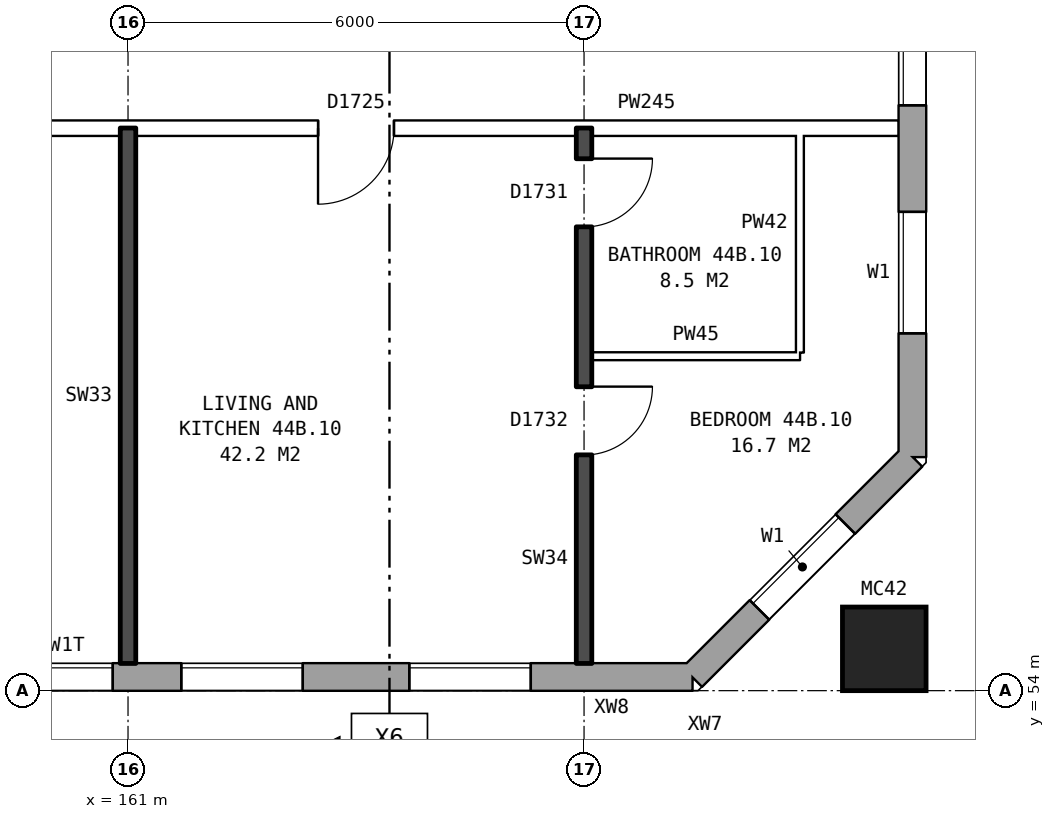
"""IFC4 building model, lengths in metres.
Left out: names, types, materials, properties, quantities, classifications, styles, units other than length and angle.
Written with IfcOpenShell. Run it as: python <this file> out.ifc"""

import sys

from ifc_helpers import new_model, si_unit, direction, frame, frame_2d, origin, origin_2d, place, context, subcontext, project, spatial, rectangle, hollow_rectangle, extrude, element, fill, save


model = new_model("IFC4")
c1 = context("Model", 3, precision=1e-05, world=origin(), true_north=direction((0.0, 1.0)))
c2 = subcontext(c1, "Body", "Model", "MODEL_VIEW")
j1 = project(units=[si_unit("LENGTHUNIT", "METRE"), si_unit("PLANEANGLEUNIT", "RADIAN")], contexts=[c1])
p1 = place(None, origin())
s1 = spatial("IfcSite", under=j1, at=p1, CompositionType="ELEMENT")
p2 = place(p1, origin())
s2 = spatial("IfcBuilding", under=s1, at=p2, CompositionType="ELEMENT")
p3 = place(p2, frame((0.0, 0.0, 157.8)))
s3 = spatial("IfcBuildingStorey", under=s2, at=p3, CompositionType="ELEMENT", Elevation=157.8)
p4 = place(p3, frame((170.95, 54.55, 0.0), z_axis=(0.0, 0.0, 1.0), x_axis=(1.0, 0.0, 0.0)))
e1 = element("IfcColumn", 1, at=p4, inside=s3, PredefinedType="COLUMN", context=c2, shape_type="SweptSolid", body=[
    extrude(hollow_rectangle(XDim=1.1, YDim=1.1, WallThickness=0.06, at=origin_2d()), origin(), (0.0, 0.0, 1.0), 3.1),
])
p5 = place(p3, frame((134.075, 54.18, 0.0), z_axis=(0.0, 0.0, 1.0), x_axis=(1.0, 0.0, 0.0)))
e2 = element("IfcWall", 2, at=p5, inside=s3, PredefinedType="STANDARD", context=c2, shape_type="SweptSolid", body=[
    extrude(rectangle(XDim=34.351, YDim=0.36, at=frame_2d((17.175, 0.0))), origin(), (0.0, 0.0, 1.0), 2.85),
])
p6 = place(p5, frame((0.625, 0.0, 0.8)))
e3 = element("IfcOpeningElement", 3, at=p6, cuts=e2, PredefinedType="OPENING", context=c2, shape_type="SweptSolid", body=[
    extrude(rectangle(XDim=1.6, YDim=1.8, at=frame_2d((0.8, 0.9))), frame((0.0, 0.19, 0.0), z_axis=(0.0, -1.0, 0.0), x_axis=(1.0, 0.0, 0.0)), (0.0, 0.0, 1.0), 0.38),
])
p7 = place(p5, frame((3.625, 0.0, 0.8)))
e4 = element("IfcOpeningElement", 4, at=p7, cuts=e2, PredefinedType="OPENING", context=c2, shape_type="SweptSolid", body=[
    extrude(rectangle(XDim=1.6, YDim=1.8, at=frame_2d((0.8, 0.9))), frame((0.0, 0.19, 0.0), z_axis=(0.0, -1.0, 0.0), x_axis=(1.0, 0.0, 0.0)), (0.0, 0.0, 1.0), 0.38),
])
p8 = place(p5, frame((5.525, 0.0, 0.8)))
e5 = element("IfcOpeningElement", 5, at=p8, cuts=e2, PredefinedType="OPENING", context=c2, shape_type="SweptSolid", body=[
    extrude(rectangle(XDim=1.4, YDim=1.8, at=frame_2d((0.7, 0.9))), frame((0.0, 0.19, 0.0), z_axis=(0.0, -1.0, 0.0), x_axis=(1.0, 0.0, 0.0)), (0.0, 0.0, 1.0), 0.38),
])
p9 = place(p5, frame((9.575, 0.0, 0.45)))
e6 = element("IfcOpeningElement", 6, at=p9, cuts=e2, PredefinedType="OPENING", context=c2, shape_type="SweptSolid", body=[
    extrude(rectangle(XDim=0.6, YDim=0.9, at=frame_2d((0.3, 0.45))), frame((0.0, 0.19, 0.0), z_axis=(0.0, -1.0, 0.0), x_axis=(1.0, 0.0, 0.0)), (0.0, 0.0, 1.0), 0.38),
])
p10 = place(p5, frame((12.625, 0.0, 0.8)))
e7 = element("IfcOpeningElement", 7, at=p10, cuts=e2, PredefinedType="OPENING", context=c2, shape_type="SweptSolid", body=[
    extrude(rectangle(XDim=1.6, YDim=1.8, at=frame_2d((0.8, 0.9))), frame((0.0, 0.19, 0.0), z_axis=(0.0, -1.0, 0.0), x_axis=(1.0, 0.0, 0.0)), (0.0, 0.0, 1.0), 0.38),
])
p11 = place(p5, frame((15.625, 0.0, 0.8)))
e8 = element("IfcOpeningElement", 8, at=p11, cuts=e2, PredefinedType="OPENING", context=c2, shape_type="SweptSolid", body=[
    extrude(rectangle(XDim=1.6, YDim=1.8, at=frame_2d((0.8, 0.9))), frame((0.0, 0.19, 0.0), z_axis=(0.0, -1.0, 0.0), x_axis=(1.0, 0.0, 0.0)), (0.0, 0.0, 1.0), 0.38),
])
p12 = place(p5, frame((18.625, 0.0, 0.8)))
e9 = element("IfcOpeningElement", 9, at=p12, cuts=e2, PredefinedType="OPENING", context=c2, shape_type="SweptSolid", body=[
    extrude(rectangle(XDim=1.6, YDim=1.8, at=frame_2d((0.8, 0.9))), frame((0.0, 0.19, 0.0), z_axis=(0.0, -1.0, 0.0), x_axis=(1.0, 0.0, 0.0)), (0.0, 0.0, 1.0), 0.38),
])
p13 = place(p5, frame((21.625, 0.0, 0.8)))
e10 = element("IfcOpeningElement", 10, at=p13, cuts=e2, PredefinedType="OPENING", context=c2, shape_type="SweptSolid", body=[
    extrude(rectangle(XDim=1.6, YDim=1.8, at=frame_2d((0.8, 0.9))), frame((0.0, 0.19, 0.0), z_axis=(0.0, -1.0, 0.0), x_axis=(1.0, 0.0, 0.0)), (0.0, 0.0, 1.0), 0.38),
])
p14 = place(p5, frame((23.525, 0.0, 0.8)))
e11 = element("IfcOpeningElement", 11, at=p14, cuts=e2, PredefinedType="OPENING", context=c2, shape_type="SweptSolid", body=[
    extrude(rectangle(XDim=0.8, YDim=0.9, at=frame_2d((0.4, 0.45))), frame((0.0, 0.19, 0.0), z_axis=(0.0, -1.0, 0.0), x_axis=(1.0, 0.0, 0.0)), (0.0, 0.0, 1.0), 0.38),
])
p15 = place(p5, frame((27.625, 0.0, 0.8)))
e12 = element("IfcOpeningElement", 12, at=p15, cuts=e2, PredefinedType="OPENING", context=c2, shape_type="SweptSolid", body=[
    extrude(rectangle(XDim=1.6, YDim=1.8, at=frame_2d((0.8, 0.9))), frame((0.0, 0.19, 0.0), z_axis=(0.0, -1.0, 0.0), x_axis=(1.0, 0.0, 0.0)), (0.0, 0.0, 1.0), 0.38),
])
p16 = place(p5, frame((30.625, 0.0, 0.8)))
e13 = element("IfcOpeningElement", 13, at=p16, cuts=e2, PredefinedType="OPENING", context=c2, shape_type="SweptSolid", body=[
    extrude(rectangle(XDim=1.6, YDim=1.8, at=frame_2d((0.8, 0.9))), frame((0.0, 0.19, 0.0), z_axis=(0.0, -1.0, 0.0), x_axis=(1.0, 0.0, 0.0)), (0.0, 0.0, 1.0), 0.38),
])
p17 = place(p5, frame((7.225, 0.0, 1.0)))
e14 = element("IfcOpeningElement", 14, at=p17, cuts=e2, PredefinedType="OPENING", context=c2, shape_type="SweptSolid", body=[
    extrude(rectangle(XDim=0.8, YDim=1.5, at=frame_2d((0.4, 0.75))), frame((0.0, 0.19, 0.0), z_axis=(0.0, -1.0, 0.0), x_axis=(1.0, 0.0, 0.0)), (0.0, 0.0, 1.0), 0.38),
])
p18 = place(p5, frame((10.575, 0.0, 0.45)))
e15 = element("IfcOpeningElement", 15, at=p18, cuts=e2, PredefinedType="OPENING", context=c2, shape_type="SweptSolid", body=[
    extrude(rectangle(XDim=1.2, YDim=1.8, at=frame_2d((0.6, 0.9))), frame((0.0, 0.19, 0.0), z_axis=(0.0, -1.0, 0.0), x_axis=(1.0, 0.0, 0.0)), (0.0, 0.0, 1.0), 0.38),
])
p19 = place(p5, frame((25.525, 0.0, 1.7)))
e16 = element("IfcOpeningElement", 16, at=p19, cuts=e2, PredefinedType="OPENING", context=c2, shape_type="SweptSolid", body=[
    extrude(rectangle(XDim=1.2, YDim=0.9, at=frame_2d((0.6, 0.45))), frame((0.0, 0.19, 0.0), z_axis=(0.0, -1.0, 0.0), x_axis=(1.0, 0.0, 0.0)), (0.0, 0.0, 1.0), 0.38),
])
p20 = place(p3, frame((168.425, 54.18, 0.0), z_axis=(0.0, 0.0, 1.0), x_axis=(0.707106781187, 0.707106781187, 0.0)))
e17 = element("IfcWall", 17, at=p20, inside=s3, PredefinedType="STANDARD", context=c2, shape_type="SweptSolid", body=[
    extrude(rectangle(XDim=4.094, YDim=0.36, at=frame_2d((2.047, 0.0))), origin(), (0.0, 0.0, 1.0), 2.85),
])
p21 = place(p20, frame((1.247, 0.0, 0.8)))
e18 = element("IfcOpeningElement", 18, at=p21, cuts=e17, PredefinedType="OPENING", context=c2, shape_type="SweptSolid", body=[
    extrude(rectangle(XDim=1.6, YDim=1.8, at=frame_2d((0.8, 0.9))), frame((0.0, 0.19, 0.0), z_axis=(0.0, -1.0, 0.0), x_axis=(1.0, 0.0, 0.0)), (0.0, 0.0, 1.0), 0.38),
])
p22 = place(p3, frame((171.32, 57.075, 0.0), z_axis=(0.0, 0.0, 1.0), x_axis=(0.0, 1.0, 0.0)))
e19 = element("IfcWall", 19, at=p22, inside=s3, PredefinedType="STANDARD", context=c2, shape_type="SweptSolid", body=[
    extrude(rectangle(XDim=25.851, YDim=0.36, at=frame_2d((12.925, 0.0))), origin(), (0.0, 0.0, 1.0), 2.85),
])
p23 = place(p22, frame((1.625, 0.0, 0.8)))
e20 = element("IfcOpeningElement", 20, at=p23, cuts=e19, PredefinedType="OPENING", context=c2, shape_type="SweptSolid", body=[
    extrude(rectangle(XDim=1.6, YDim=1.8, at=frame_2d((0.8, 0.9))), frame((0.0, 0.19, 0.0), z_axis=(0.0, -1.0, 0.0), x_axis=(1.0, 0.0, 0.0)), (0.0, 0.0, 1.0), 0.38),
])
p24 = place(p22, frame((4.625, 0.0, 0.8)))
e21 = element("IfcOpeningElement", 21, at=p24, cuts=e19, PredefinedType="OPENING", context=c2, shape_type="SweptSolid", body=[
    extrude(rectangle(XDim=1.6, YDim=1.8, at=frame_2d((0.8, 0.9))), frame((0.0, 0.19, 0.0), z_axis=(0.0, -1.0, 0.0), x_axis=(1.0, 0.0, 0.0)), (0.0, 0.0, 1.0), 0.38),
])
p25 = place(p22, frame((6.525, 0.0, 0.8)))
e22 = element("IfcOpeningElement", 22, at=p25, cuts=e19, PredefinedType="OPENING", context=c2, shape_type="SweptSolid", body=[
    extrude(rectangle(XDim=1.6, YDim=1.5, at=frame_2d((0.8, 0.75))), frame((0.0, 0.19, 0.0), z_axis=(0.0, -1.0, 0.0), x_axis=(1.0, 0.0, 0.0)), (0.0, 0.0, 1.0), 0.38),
])
p26 = place(p22, frame((8.425, 0.0, 0.8)))
e23 = element("IfcOpeningElement", 23, at=p26, cuts=e19, PredefinedType="OPENING", context=c2, shape_type="SweptSolid", body=[
    extrude(rectangle(XDim=0.6, YDim=0.9, at=frame_2d((0.3, 0.45))), frame((0.0, 0.19, 0.0), z_axis=(0.0, -1.0, 0.0), x_axis=(1.0, 0.0, 0.0)), (0.0, 0.0, 1.0), 0.38),
])
p27 = place(p22, frame((10.225, 0.0, 1.7)))
e24 = element("IfcOpeningElement", 24, at=p27, cuts=e19, PredefinedType="OPENING", context=c2, shape_type="SweptSolid", body=[
    extrude(rectangle(XDim=1.2, YDim=0.9, at=frame_2d((0.6, 0.45))), frame((0.0, 0.19, 0.0), z_axis=(0.0, -1.0, 0.0), x_axis=(1.0, 0.0, 0.0)), (0.0, 0.0, 1.0), 0.38),
])
p28 = place(p22, frame((11.725, 0.0, 0.8)))
e25 = element("IfcOpeningElement", 25, at=p28, cuts=e19, PredefinedType="OPENING", context=c2, shape_type="SweptSolid", body=[
    extrude(rectangle(XDim=1.6, YDim=1.8, at=frame_2d((0.8, 0.9))), frame((0.0, 0.19, 0.0), z_axis=(0.0, -1.0, 0.0), x_axis=(1.0, 0.0, 0.0)), (0.0, 0.0, 1.0), 0.38),
])
p29 = place(p22, frame((19.625, 0.0, 0.8)))
e26 = element("IfcOpeningElement", 26, at=p29, cuts=e19, PredefinedType="OPENING", context=c2, shape_type="SweptSolid", body=[
    extrude(rectangle(XDim=1.6, YDim=1.8, at=frame_2d((0.8, 0.9))), frame((0.0, 0.19, 0.0), z_axis=(0.0, -1.0, 0.0), x_axis=(1.0, 0.0, 0.0)), (0.0, 0.0, 1.0), 0.38),
])
p30 = place(p22, frame((22.625, 0.0, 0.8)))
e27 = element("IfcOpeningElement", 27, at=p30, cuts=e19, PredefinedType="OPENING", context=c2, shape_type="SweptSolid", body=[
    extrude(rectangle(XDim=1.6, YDim=1.8, at=frame_2d((0.8, 0.9))), frame((0.0, 0.19, 0.0), z_axis=(0.0, -1.0, 0.0), x_axis=(1.0, 0.0, 0.0)), (0.0, 0.0, 1.0), 0.38),
])
p31 = place(p22, frame((13.625, 0.0, 1.1)))
e28 = element("IfcOpeningElement", 28, at=p31, cuts=e19, PredefinedType="OPENING", context=c2, shape_type="SweptSolid", body=[
    extrude(rectangle(XDim=1.0, YDim=1.5, at=frame_2d((0.5, 0.75))), frame((0.0, 0.19, 0.0), z_axis=(0.0, -1.0, 0.0), x_axis=(1.0, 0.0, 0.0)), (0.0, 0.0, 1.0), 0.38),
])
p32 = place(p22, frame((14.925, 0.0, 1.7)))
e29 = element("IfcOpeningElement", 29, at=p32, cuts=e19, PredefinedType="OPENING", context=c2, shape_type="SweptSolid", body=[
    extrude(rectangle(XDim=0.6, YDim=0.9, at=frame_2d((0.3, 0.45))), frame((0.0, 0.19, 0.0), z_axis=(0.0, -1.0, 0.0), x_axis=(1.0, 0.0, 0.0)), (0.0, 0.0, 1.0), 0.38),
])
p33 = place(p22, frame((16.675, 0.0, 0.8)))
e30 = element("IfcOpeningElement", 30, at=p33, cuts=e19, PredefinedType="OPENING", context=c2, shape_type="SweptSolid", body=[
    extrude(rectangle(XDim=0.6, YDim=0.9, at=frame_2d((0.3, 0.45))), frame((0.0, 0.19, 0.0), z_axis=(0.0, -1.0, 0.0), x_axis=(1.0, 0.0, 0.0)), (0.0, 0.0, 1.0), 0.38),
])
p34 = place(p22, frame((17.675, 0.0, 0.8)))
e31 = element("IfcOpeningElement", 31, at=p34, cuts=e19, PredefinedType="OPENING", context=c2, shape_type="SweptSolid", body=[
    extrude(rectangle(XDim=1.6, YDim=1.5, at=frame_2d((0.8, 0.75))), frame((0.0, 0.19, 0.0), z_axis=(0.0, -1.0, 0.0), x_axis=(1.0, 0.0, 0.0)), (0.0, 0.0, 1.0), 0.38),
])
p35 = place(p3, frame((167.1, 58.4, 0.0), z_axis=(0.0, 0.0, 1.0), x_axis=(1.0, 0.0, 0.0)))
e32 = element("IfcWall", 32, at=p35, inside=s3, PredefinedType="PARTITIONING", context=c2, shape_type="SweptSolid", body=[
    extrude(rectangle(XDim=2.74, YDim=0.1, at=frame_2d((1.37, 0.0))), origin(), (0.0, 0.0, 1.0), 2.85),
])
p36 = place(p3, frame((155.1, 61.4, 0.0), z_axis=(0.0, 0.0, 1.0), x_axis=(1.0, 0.0, 0.0)))
e33 = element("IfcWall", 33, at=p36, inside=s3, PredefinedType="PARTITIONING", context=c2, shape_type="SweptSolid", body=[
    extrude(rectangle(XDim=16.04, YDim=0.2, at=frame_2d((8.02, 0.0))), origin(), (0.0, 0.0, 1.0), 2.85),
])
p37 = place(p36, frame((3.6, 0.0, 0.0)))
e34 = element("IfcOpeningElement", 34, at=p37, cuts=e33, PredefinedType="OPENING", context=c2, shape_type="SweptSolid", body=[
    extrude(rectangle(XDim=1.0, YDim=2.1, at=frame_2d((0.5, 1.05))), frame((0.0, 0.11, 0.0), z_axis=(0.0, -1.0, 0.0), x_axis=(1.0, 0.0, 0.0)), (0.0, 0.0, 1.0), 0.22),
])
p38 = place(p36, frame((8.4, 0.0, 0.0)))
e35 = element("IfcOpeningElement", 35, at=p38, cuts=e33, PredefinedType="OPENING", context=c2, shape_type="SweptSolid", body=[
    extrude(rectangle(XDim=1.0, YDim=2.1, at=frame_2d((0.5, 1.05))), frame((0.0, 0.11, 0.0), z_axis=(0.0, -1.0, 0.0), x_axis=(1.0, 0.0, 0.0)), (0.0, 0.0, 1.0), 0.22),
])
p39 = place(p3, frame((161.0, 54.36, 0.0), z_axis=(0.0, 0.0, 1.0), x_axis=(0.0, 1.0, 0.0)))
e36 = element("IfcWall", 36, at=p39, inside=s3, PredefinedType="SOLIDWALL", context=c2, shape_type="SweptSolid", body=[
    extrude(rectangle(XDim=7.04, YDim=0.2, at=frame_2d((3.52, 0.0))), origin(), (0.0, 0.0, 1.0), 2.85),
])
p40 = place(p3, frame((167.0, 54.36, 0.0), z_axis=(0.0, 0.0, 1.0), x_axis=(0.0, 1.0, 0.0)))
e37 = element("IfcWall", 37, at=p40, inside=s3, PredefinedType="SOLIDWALL", context=c2, shape_type="SweptSolid", body=[
    extrude(rectangle(XDim=7.04, YDim=0.2, at=frame_2d((3.52, 0.0))), origin(), (0.0, 0.0, 1.0), 2.85),
])
p41 = place(p40, frame((2.74, 0.0, 0.0)))
e38 = element("IfcOpeningElement", 38, at=p41, cuts=e37, PredefinedType="OPENING", context=c2, shape_type="SweptSolid", body=[
    extrude(rectangle(XDim=0.9, YDim=2.1, at=frame_2d((0.45, 1.05))), frame((0.0, 0.11, 0.0), z_axis=(0.0, -1.0, 0.0), x_axis=(1.0, 0.0, 0.0)), (0.0, 0.0, 1.0), 0.22),
])
p42 = place(p40, frame((5.74, 0.0, 0.0)))
e39 = element("IfcOpeningElement", 39, at=p42, cuts=e37, PredefinedType="OPENING", context=c2, shape_type="SweptSolid", body=[
    extrude(rectangle(XDim=0.9, YDim=2.1, at=frame_2d((0.45, 1.05))), frame((0.0, 0.11, 0.0), z_axis=(0.0, -1.0, 0.0), x_axis=(1.0, 0.0, 0.0)), (0.0, 0.0, 1.0), 0.22),
])
p43 = place(p3, frame((169.84, 58.45, 0.0), z_axis=(0.0, 0.0, 1.0), x_axis=(0.0, 1.0, 0.0)))
e40 = element("IfcWall", 40, at=p43, inside=s3, PredefinedType="PARTITIONING", context=c2, shape_type="SweptSolid", body=[
    extrude(rectangle(XDim=2.85, YDim=0.1, at=frame_2d((1.425, 0.0))), origin(), (0.0, 0.0, 1.0), 2.85),
])
p44 = place(p15, origin())
e41 = element("IfcWindow", 41, at=p44, inside=s3, PartitioningType="SINGLE_PANEL", PredefinedType="WINDOW", context=c2, shape_type="SweptSolid", body=[
    extrude(rectangle(XDim=1.6, YDim=1.8, at=frame_2d((0.8, 0.9))), frame((0.0, 0.15, 0.0), z_axis=(0.0, -1.0, 0.0), x_axis=(1.0, 0.0, 0.0)), (0.0, 0.0, 1.0), 0.06),
])
fill(e12, e41)
p45 = place(p16, origin())
e42 = element("IfcWindow", 42, at=p45, inside=s3, PartitioningType="SINGLE_PANEL", PredefinedType="WINDOW", context=c2, shape_type="SweptSolid", body=[
    extrude(rectangle(XDim=1.6, YDim=1.8, at=frame_2d((0.8, 0.9))), frame((0.0, 0.15, 0.0), z_axis=(0.0, -1.0, 0.0), x_axis=(1.0, 0.0, 0.0)), (0.0, 0.0, 1.0), 0.06),
])
fill(e13, e42)
p46 = place(p21, origin())
e43 = element("IfcWindow", 43, at=p46, inside=s3, PartitioningType="SINGLE_PANEL", PredefinedType="WINDOW", context=c2, shape_type="SweptSolid", body=[
    extrude(rectangle(XDim=1.6, YDim=1.8, at=frame_2d((0.8, 0.9))), frame((0.0, 0.15, 0.0), z_axis=(0.0, -1.0, 0.0), x_axis=(1.0, 0.0, 0.0)), (0.0, 0.0, 1.0), 0.06),
])
fill(e18, e43)
p47 = place(p23, origin())
e44 = element("IfcWindow", 44, at=p47, inside=s3, PartitioningType="SINGLE_PANEL", PredefinedType="WINDOW", context=c2, shape_type="SweptSolid", body=[
    extrude(rectangle(XDim=1.6, YDim=1.8, at=frame_2d((0.8, 0.9))), frame((0.0, 0.15, 0.0), z_axis=(0.0, -1.0, 0.0), x_axis=(1.0, 0.0, 0.0)), (0.0, 0.0, 1.0), 0.06),
])
fill(e20, e44)
p48 = place(p24, origin())
e45 = element("IfcWindow", 45, at=p48, inside=s3, PartitioningType="SINGLE_PANEL", PredefinedType="WINDOW", context=c2, shape_type="SweptSolid", body=[
    extrude(rectangle(XDim=1.6, YDim=1.8, at=frame_2d((0.8, 0.9))), frame((0.0, 0.15, 0.0), z_axis=(0.0, -1.0, 0.0), x_axis=(1.0, 0.0, 0.0)), (0.0, 0.0, 1.0), 0.06),
])
fill(e21, e45)
p49 = place(p41, frame((0.9, 0.0, 0.0), z_axis=(0.0, 0.0, 1.0), x_axis=(-1.0, 0.0, 0.0)))
e46 = element("IfcDoor", 46, at=p49, inside=s3, OperationType="SINGLE_SWING_LEFT", PredefinedType="DOOR", context=c2, shape_type="SweptSolid", body=[
    extrude(rectangle(XDim=0.9, YDim=2.1, at=frame_2d((0.45, 1.05))), frame((0.0, 0.025, 0.0), z_axis=(0.0, -1.0, 0.0), x_axis=(1.0, 0.0, 0.0)), (0.0, 0.0, 1.0), 0.05),
])
fill(e38, e46)
p50 = place(p38, frame((1.0, 0.0, 0.0), z_axis=(0.0, 0.0, 1.0), x_axis=(-1.0, 0.0, 0.0)))
e47 = element("IfcDoor", 47, at=p50, inside=s3, OperationType="SINGLE_SWING_RIGHT", PredefinedType="DOOR", context=c2, shape_type="SweptSolid", body=[
    extrude(rectangle(XDim=1.0, YDim=2.1, at=frame_2d((0.5, 1.05))), frame((0.0, 0.025, 0.0), z_axis=(0.0, -1.0, 0.0), x_axis=(1.0, 0.0, 0.0)), (0.0, 0.0, 1.0), 0.05),
])
fill(e35, e47)
p51 = place(p42, frame((0.9, 0.0, 0.0), z_axis=(0.0, 0.0, 1.0), x_axis=(-1.0, 0.0, 0.0)))
e48 = element("IfcDoor", 48, at=p51, inside=s3, OperationType="SINGLE_SWING_LEFT", PredefinedType="DOOR", context=c2, shape_type="SweptSolid", body=[
    extrude(rectangle(XDim=0.9, YDim=2.1, at=frame_2d((0.45, 1.05))), frame((0.0, 0.025, 0.0), z_axis=(0.0, -1.0, 0.0), x_axis=(1.0, 0.0, 0.0)), (0.0, 0.0, 1.0), 0.05),
])
fill(e39, e48)
p52 = place(p19, origin())
e49 = element("IfcWindow", 49, at=p52, inside=s3, PartitioningType="SINGLE_PANEL", PredefinedType="WINDOW", context=c2, shape_type="SweptSolid", body=[
    extrude(rectangle(XDim=1.2, YDim=0.9, at=frame_2d((0.6, 0.45))), frame((0.0, 0.15, 0.0), z_axis=(0.0, -1.0, 0.0), x_axis=(1.0, 0.0, 0.0)), (0.0, 0.0, 1.0), 0.06),
])
fill(e16, e49)
save(model, sys.argv[1])
